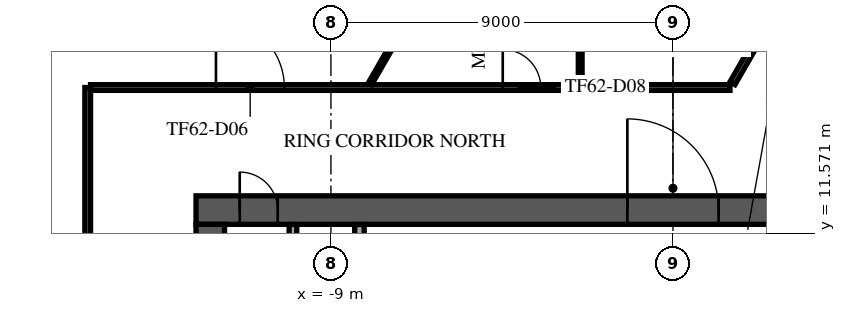
"""IFC4 building model, lengths in metres.
Left out: names, types, materials, properties, quantities, classifications, styles, units other than length and angle.
Written with IfcOpenShell. Run it as: python <this file> out.ifc"""

import sys

from ifc_helpers import new_model, si_unit, direction, frame, frame_2d, origin, place, context, subcontext, project, spatial, rectangle, extrude, element, fill, save


model = new_model("IFC4")
c1 = context("Model", 3, precision=1e-05, world=origin(), true_north=direction((0.0, 1.0)))
c2 = subcontext(c1, "Body", "Model", "MODEL_VIEW")
j1 = project(units=[si_unit("LENGTHUNIT", "METRE"), si_unit("PLANEANGLEUNIT", "RADIAN")], contexts=[c1])
p1 = place(None, origin())
s1 = spatial("IfcSite", under=j1, at=p1, CompositionType="ELEMENT")
p2 = place(p1, origin())
s2 = spatial("IfcBuilding", under=s1, at=p2, CompositionType="ELEMENT")
p3 = place(p2, frame((0.0, 0.0, 262.9)))
s3 = spatial("IfcBuildingStorey", under=s2, at=p3, CompositionType="ELEMENT", Elevation=262.9)
p4 = place(p3, frame((-12.55, 12.175, 0.0), z_axis=(0.0, 0.0, 1.0), x_axis=(1.0, 0.0, 0.0)))
e1 = element("IfcWall", 1, at=p4, inside=s3, PredefinedType="SHEAR", context=c2, shape_type="SweptSolid", body=[
    extrude(rectangle(XDim=25.1, YDim=0.75, at=frame_2d((12.55, 0.0))), origin(), (0.0, 0.0, 1.0), 3.64),
])
p5 = place(p4, frame((11.35, 0.0, 0.0)))
e2 = element("IfcOpeningElement", 2, at=p5, cuts=e1, PredefinedType="OPENING", context=c2, shape_type="SweptSolid", body=[
    extrude(rectangle(XDim=2.4, YDim=2.4, at=frame_2d((1.2, 1.2))), frame((0.0, 0.385, 0.0), z_axis=(0.0, -1.0, 0.0), x_axis=(1.0, 0.0, 0.0)), (0.0, 0.0, 1.0), 0.77),
])
p6 = place(p4, frame((22.175, 0.0, 0.0)))
e3 = element("IfcOpeningElement", 3, at=p6, cuts=e1, PredefinedType="OPENING", context=c2, shape_type="SweptSolid", body=[
    extrude(rectangle(XDim=1.2, YDim=2.1, at=frame_2d((0.6, 1.05))), frame((0.0, 0.385, 0.0), z_axis=(0.0, -1.0, 0.0), x_axis=(1.0, 0.0, 0.0)), (0.0, 0.0, 1.0), 0.77),
])
p7 = place(p4, frame((1.15, 0.0, 0.0)))
e4 = element("IfcOpeningElement", 4, at=p7, cuts=e1, PredefinedType="OPENING", context=c2, shape_type="SweptSolid", body=[
    extrude(rectangle(XDim=1.0, YDim=2.1, at=frame_2d((0.5, 1.05))), frame((0.0, 0.385, 0.0), z_axis=(0.0, -1.0, 0.0), x_axis=(1.0, 0.0, 0.0)), (0.0, 0.0, 1.0), 0.77),
])
p8 = place(p3, frame((-12.175, -11.8, 0.0), z_axis=(0.0, 0.0, 1.0), x_axis=(0.0, 1.0, 0.0)))
e5 = element("IfcWall", 5, at=p8, inside=s3, PredefinedType="SHEAR", context=c2, shape_type="SweptSolid", body=[
    extrude(rectangle(XDim=23.6, YDim=0.75, at=frame_2d((11.8, 0.0))), origin(), (0.0, 0.0, 1.0), 3.64),
])
p9 = place(p8, frame((10.6, 0.0, 0.0)))
e6 = element("IfcOpeningElement", 6, at=p9, cuts=e5, PredefinedType="OPENING", context=c2, shape_type="SweptSolid", body=[
    extrude(rectangle(XDim=2.4, YDim=2.4, at=frame_2d((1.2, 1.2))), frame((0.0, 0.385, 0.0), z_axis=(0.0, -1.0, 0.0), x_axis=(1.0, 0.0, 0.0)), (0.0, 0.0, 1.0), 0.77),
])
p10 = place(p3, frame((-10.0, 4.78, 0.0), z_axis=(0.0, 0.0, 1.0), x_axis=(0.0, 1.0, 0.0)))
e7 = element("IfcWall", 7, at=p10, inside=s3, PredefinedType="PARTITIONING", context=c2, shape_type="SweptSolid", body=[
    extrude(rectangle(XDim=7.015, YDim=0.2, at=frame_2d((3.507, 0.0))), origin(), (0.0, 0.0, 1.0), 3.64),
])
p11 = place(p10, frame((2.92, 0.0, 0.0)))
e8 = element("IfcOpeningElement", 8, at=p11, cuts=e7, PredefinedType="OPENING", context=c2, shape_type="SweptSolid", body=[
    extrude(rectangle(XDim=1.0, YDim=2.1, at=frame_2d((0.5, 1.05))), frame((0.0, 0.11, 0.0), z_axis=(0.0, -1.0, 0.0), x_axis=(1.0, 0.0, 0.0)), (0.0, 0.0, 1.0), 0.22),
])
p12 = place(p3, frame((-8.25, 8.805, 0.0), z_axis=(0.0, 0.0, 1.0), x_axis=(0.0, 1.0, 0.0)))
e9 = element("IfcWall", 9, at=p12, inside=s3, PredefinedType="PARTITIONING", context=c2, shape_type="SweptSolid", body=[
    extrude(rectangle(XDim=2.99, YDim=0.25, at=frame_2d((1.495, 0.0))), origin(), (0.0, 0.0, 1.0), 3.64),
])
p13 = place(p12, frame((0.895, 0.0, 0.0)))
e10 = element("IfcOpeningElement", 10, at=p13, cuts=e9, PredefinedType="OPENING", context=c2, shape_type="SweptSolid", body=[
    extrude(rectangle(XDim=1.0, YDim=2.1, at=frame_2d((0.5, 1.05))), frame((0.0, 0.135, 0.0), z_axis=(0.0, -1.0, 0.0), x_axis=(1.0, 0.0, 0.0)), (0.0, 0.0, 1.0), 0.27),
])
p14 = place(p3, frame((-8.015, 32.917, 0.0), z_axis=(0.0, 0.0, 1.0), x_axis=(-0.500001675963, -0.866024436165, 0.0)))
e11 = element("IfcWall", 11, at=p14, inside=s3, PredefinedType="STANDARD", context=c2, shape_type="SweptSolid", body=[
    extrude(rectangle(XDim=48.843, YDim=0.6, at=frame_2d((24.421, 0.0))), origin(), (0.0, 0.0, 1.0), 3.64),
])
p15 = place(p14, frame((1.22, 0.0, 0.9)))
e12 = element("IfcOpeningElement", 12, at=p15, cuts=e11, PredefinedType="OPENING", context=c2, shape_type="SweptSolid", body=[
    extrude(rectangle(XDim=2.0, YDim=2.1, at=frame_2d((1.0, 1.05))), frame((0.0, 0.31, 0.0), z_axis=(0.0, -1.0, 0.0), x_axis=(1.0, 0.0, 0.0)), (0.0, 0.0, 1.0), 0.62),
])
p16 = place(p14, frame((5.66, 0.0, 0.9)))
e13 = element("IfcOpeningElement", 13, at=p16, cuts=e11, PredefinedType="OPENING", context=c2, shape_type="SweptSolid", body=[
    extrude(rectangle(XDim=2.0, YDim=2.1, at=frame_2d((1.0, 1.05))), frame((0.0, 0.31, 0.0), z_axis=(0.0, -1.0, 0.0), x_axis=(1.0, 0.0, 0.0)), (0.0, 0.0, 1.0), 0.62),
])
p17 = place(p14, frame((10.101, 0.0, 0.9)))
e14 = element("IfcOpeningElement", 14, at=p17, cuts=e11, PredefinedType="OPENING", context=c2, shape_type="SweptSolid", body=[
    extrude(rectangle(XDim=2.0, YDim=2.1, at=frame_2d((1.0, 1.05))), frame((0.0, 0.31, 0.0), z_axis=(0.0, -1.0, 0.0), x_axis=(1.0, 0.0, 0.0)), (0.0, 0.0, 1.0), 0.62),
])
p18 = place(p14, frame((14.541, 0.0, 0.9)))
e15 = element("IfcOpeningElement", 15, at=p18, cuts=e11, PredefinedType="OPENING", context=c2, shape_type="SweptSolid", body=[
    extrude(rectangle(XDim=2.0, YDim=2.1, at=frame_2d((1.0, 1.05))), frame((0.0, 0.31, 0.0), z_axis=(0.0, -1.0, 0.0), x_axis=(1.0, 0.0, 0.0)), (0.0, 0.0, 1.0), 0.62),
])
p19 = place(p14, frame((18.981, 0.0, 0.9)))
e16 = element("IfcOpeningElement", 16, at=p19, cuts=e11, PredefinedType="OPENING", context=c2, shape_type="SweptSolid", body=[
    extrude(rectangle(XDim=2.0, YDim=2.1, at=frame_2d((1.0, 1.05))), frame((0.0, 0.31, 0.0), z_axis=(0.0, -1.0, 0.0), x_axis=(1.0, 0.0, 0.0)), (0.0, 0.0, 1.0), 0.62),
])
p20 = place(p14, frame((23.422, 0.0, 0.9)))
e17 = element("IfcOpeningElement", 17, at=p20, cuts=e11, PredefinedType="OPENING", context=c2, shape_type="SweptSolid", body=[
    extrude(rectangle(XDim=2.0, YDim=2.1, at=frame_2d((1.0, 1.05))), frame((0.0, 0.31, 0.0), z_axis=(0.0, -1.0, 0.0), x_axis=(1.0, 0.0, 0.0)), (0.0, 0.0, 1.0), 0.62),
])
p21 = place(p14, frame((27.862, 0.0, 0.9)))
e18 = element("IfcOpeningElement", 18, at=p21, cuts=e11, PredefinedType="OPENING", context=c2, shape_type="SweptSolid", body=[
    extrude(rectangle(XDim=2.0, YDim=2.1, at=frame_2d((1.0, 1.05))), frame((0.0, 0.31, 0.0), z_axis=(0.0, -1.0, 0.0), x_axis=(1.0, 0.0, 0.0)), (0.0, 0.0, 1.0), 0.62),
])
p22 = place(p14, frame((32.302, 0.0, 0.9)))
e19 = element("IfcOpeningElement", 19, at=p22, cuts=e11, PredefinedType="OPENING", context=c2, shape_type="SweptSolid", body=[
    extrude(rectangle(XDim=2.0, YDim=2.1, at=frame_2d((1.0, 1.05))), frame((0.0, 0.31, 0.0), z_axis=(0.0, -1.0, 0.0), x_axis=(1.0, 0.0, 0.0)), (0.0, 0.0, 1.0), 0.62),
])
p23 = place(p14, frame((36.742, 0.0, 0.9)))
e20 = element("IfcOpeningElement", 20, at=p23, cuts=e11, PredefinedType="OPENING", context=c2, shape_type="SweptSolid", body=[
    extrude(rectangle(XDim=2.0, YDim=2.1, at=frame_2d((1.0, 1.05))), frame((0.0, 0.31, 0.0), z_axis=(0.0, -1.0, 0.0), x_axis=(1.0, 0.0, 0.0)), (0.0, 0.0, 1.0), 0.62),
])
p24 = place(p14, frame((41.183, 0.0, 0.9)))
e21 = element("IfcOpeningElement", 21, at=p24, cuts=e11, PredefinedType="OPENING", context=c2, shape_type="SweptSolid", body=[
    extrude(rectangle(XDim=2.0, YDim=2.1, at=frame_2d((1.0, 1.05))), frame((0.0, 0.31, 0.0), z_axis=(0.0, -1.0, 0.0), x_axis=(1.0, 0.0, 0.0)), (0.0, 0.0, 1.0), 0.62),
])
p25 = place(p14, frame((45.623, 0.0, 0.9)))
e22 = element("IfcOpeningElement", 22, at=p25, cuts=e11, PredefinedType="OPENING", context=c2, shape_type="SweptSolid", body=[
    extrude(rectangle(XDim=2.0, YDim=2.1, at=frame_2d((1.0, 1.05))), frame((0.0, 0.31, 0.0), z_axis=(0.0, -1.0, 0.0), x_axis=(1.0, 0.0, 0.0)), (0.0, 0.0, 1.0), 0.62),
])
p26 = place(p3, frame((-15.4, -10.72, 0.0), z_axis=(0.0, 0.0, 1.0), x_axis=(0.0, 1.0, 0.0)))
e23 = element("IfcWall", 23, at=p26, inside=s3, PredefinedType="PARTITIONING", context=c2, shape_type="SweptSolid", body=[
    extrude(rectangle(XDim=26.12, YDim=0.15, at=frame_2d((13.06, 0.0))), origin(), (0.0, 0.0, 1.0), 3.24),
])
p27 = place(p26, frame((1.05, 0.0, 0.0)))
e24 = element("IfcOpeningElement", 24, at=p27, cuts=e23, PredefinedType="OPENING", context=c2, shape_type="SweptSolid", body=[
    extrude(rectangle(XDim=1.0, YDim=2.1, at=frame_2d((0.5, 1.05))), frame((0.0, 0.085, 0.0), z_axis=(0.0, -1.0, 0.0), x_axis=(1.0, 0.0, 0.0)), (0.0, 0.0, 1.0), 0.17),
])
p28 = place(p26, frame((15.124, 0.0, 0.0)))
e25 = element("IfcOpeningElement", 25, at=p28, cuts=e23, PredefinedType="OPENING", context=c2, shape_type="SweptSolid", body=[
    extrude(rectangle(XDim=1.0, YDim=2.1, at=frame_2d((0.5, 1.05))), frame((0.0, 0.085, 0.0), z_axis=(0.0, -1.0, 0.0), x_axis=(1.0, 0.0, 0.0)), (0.0, 0.0, 1.0), 0.17),
])
p29 = place(p3, frame((-15.325, 15.4, 0.0), z_axis=(0.0, 0.0, 1.0), x_axis=(1.0, 0.0, 0.0)))
e26 = element("IfcWall", 26, at=p29, inside=s3, PredefinedType="PARTITIONING", context=c2, shape_type="SweptSolid", body=[
    extrude(rectangle(XDim=16.826, YDim=0.15, at=frame_2d((8.413, 0.0))), origin(), (0.0, 0.0, 1.0), 3.24),
])
p30 = place(p29, frame((3.3, 0.0, 0.0)))
e27 = element("IfcOpeningElement", 27, at=p30, cuts=e26, PredefinedType="OPENING", context=c2, shape_type="SweptSolid", body=[
    extrude(rectangle(XDim=1.8, YDim=2.1, at=frame_2d((0.9, 1.05))), frame((0.0, 0.085, 0.0), z_axis=(0.0, -1.0, 0.0), x_axis=(1.0, 0.0, 0.0)), (0.0, 0.0, 1.0), 0.17),
])
p31 = place(p29, frame((10.846, 0.0, 0.0)))
e28 = element("IfcOpeningElement", 28, at=p31, cuts=e26, PredefinedType="OPENING", context=c2, shape_type="SweptSolid", body=[
    extrude(rectangle(XDim=1.0, YDim=2.1, at=frame_2d((0.5, 1.05))), frame((0.0, 0.085, 0.0), z_axis=(0.0, -1.0, 0.0), x_axis=(1.0, 0.0, 0.0)), (0.0, 0.0, 1.0), 0.17),
])
p32 = place(p3, frame((-7.247, 26.698, 0.0), z_axis=(0.0, 0.0, 1.0), x_axis=(0.866022442497, -0.500005129065, 0.0)))
e29 = element("IfcWall", 29, at=p32, inside=s3, PredefinedType="PARTITIONING", context=c2, shape_type="SweptSolid", body=[
    extrude(rectangle(XDim=39.325, YDim=0.15, at=frame_2d((19.662, 0.0))), origin(), (0.0, 0.0, 1.0), 3.04),
])
p33 = place(p32, frame((15.654, 0.0, 0.0)))
e30 = element("IfcOpeningElement", 30, at=p33, cuts=e29, PredefinedType="OPENING", context=c2, shape_type="SweptSolid", body=[
    extrude(rectangle(XDim=1.0, YDim=2.1, at=frame_2d((0.5, 1.05))), frame((0.0, 0.085, 0.0), z_axis=(0.0, -1.0, 0.0), x_axis=(1.0, 0.0, 0.0)), (0.0, 0.0, 1.0), 0.17),
])
p34 = place(p32, frame((23.442, 0.0, 0.0)))
e31 = element("IfcOpeningElement", 31, at=p34, cuts=e29, PredefinedType="OPENING", context=c2, shape_type="SweptSolid", body=[
    extrude(rectangle(XDim=1.0, YDim=2.1, at=frame_2d((0.5, 1.05))), frame((0.0, 0.085, 0.0), z_axis=(0.0, -1.0, 0.0), x_axis=(1.0, 0.0, 0.0)), (0.0, 0.0, 1.0), 0.17),
])
p35 = place(p32, frame((31.841, 0.0, 0.0)))
e32 = element("IfcOpeningElement", 32, at=p35, cuts=e29, PredefinedType="OPENING", context=c2, shape_type="SweptSolid", body=[
    extrude(rectangle(XDim=1.0, YDim=2.1, at=frame_2d((0.5, 1.05))), frame((0.0, 0.085, 0.0), z_axis=(0.0, -1.0, 0.0), x_axis=(1.0, 0.0, 0.0)), (0.0, 0.0, 1.0), 0.17),
])
p36 = place(p32, frame((36.955, 0.0, 0.0)))
e33 = element("IfcOpeningElement", 33, at=p36, cuts=e29, PredefinedType="OPENING", context=c2, shape_type="SweptSolid", body=[
    extrude(rectangle(XDim=1.0, YDim=2.1, at=frame_2d((0.5, 1.05))), frame((0.0, 0.085, 0.0), z_axis=(0.0, -1.0, 0.0), x_axis=(1.0, 0.0, 0.0)), (0.0, 0.0, 1.0), 0.17),
])
p37 = place(p3, frame((1.566, 15.512, 0.0), z_axis=(0.0, 0.0, 1.0), x_axis=(0.500136902793, 0.865946348491, 0.0)))
e34 = element("IfcWall", 34, at=p37, inside=s3, PredefinedType="PARTITIONING", context=c2, shape_type="SweptSolid", body=[
    extrude(rectangle(XDim=2.804, YDim=0.15, at=frame_2d((1.402, 0.0))), origin(), (0.0, 0.0, 1.0), 3.64),
])
p38 = place(p3, frame((-7.971, 15.5, 0.0), z_axis=(0.0, 0.0, 1.0), x_axis=(0.499964887799, 0.866045674874, 0.0)))
e35 = element("IfcWall", 35, at=p38, inside=s3, PredefinedType="PARTITIONING", context=c2, shape_type="SweptSolid", body=[
    extrude(rectangle(XDim=7.584, YDim=0.1, at=frame_2d((3.792, 0.0))), origin(), (0.0, 0.0, 1.0), 3.24),
])
p39 = place(p3, frame((-2.441, 15.475, 0.0), z_axis=(0.0, 0.0, 1.0), x_axis=(0.0, 1.0, 0.0)))
e36 = element("IfcWall", 36, at=p39, inside=s3, PredefinedType="PARTITIONING", context=c2, shape_type="SweptSolid", body=[
    extrude(rectangle(XDim=5.56, YDim=0.1, at=frame_2d((2.78, 0.0))), origin(), (0.0, 0.0, 1.0), 3.64),
])
p40 = place(p5, origin())
e37 = element("IfcDoor", 37, at=p40, inside=s3, OperationType="SINGLE_SWING_LEFT", PredefinedType="DOOR", context=c2, shape_type="SweptSolid", body=[
    extrude(rectangle(XDim=2.4, YDim=2.4, at=frame_2d((1.2, 1.2))), frame((0.0, 0.025, 0.0), z_axis=(0.0, -1.0, 0.0), x_axis=(1.0, 0.0, 0.0)), (0.0, 0.0, 1.0), 0.05),
])
fill(e2, e37)
p41 = place(p7, origin())
e38 = element("IfcDoor", 38, at=p41, inside=s3, OperationType="SINGLE_SWING_LEFT", PredefinedType="DOOR", context=c2, shape_type="SweptSolid", body=[
    extrude(rectangle(XDim=1.0, YDim=2.1, at=frame_2d((0.5, 1.05))), frame((0.0, 0.025, 0.0), z_axis=(0.0, -1.0, 0.0), x_axis=(1.0, 0.0, 0.0)), (0.0, 0.0, 1.0), 0.05),
])
fill(e4, e38)
p42 = place(p30, origin())
e39 = element("IfcDoor", 39, at=p42, inside=s3, OperationType="DOUBLE_DOOR_SINGLE_SWING", PredefinedType="DOOR", context=c2, shape_type="SweptSolid", body=[
    extrude(rectangle(XDim=1.8, YDim=2.1, at=frame_2d((0.9, 1.05))), frame((0.0, 0.025, 0.0), z_axis=(0.0, -1.0, 0.0), x_axis=(1.0, 0.0, 0.0)), (0.0, 0.0, 1.0), 0.05),
])
fill(e27, e39)
p43 = place(p31, origin())
e40 = element("IfcDoor", 40, at=p43, inside=s3, OperationType="SINGLE_SWING_RIGHT", PredefinedType="DOOR", context=c2, shape_type="SweptSolid", body=[
    extrude(rectangle(XDim=1.0, YDim=2.1, at=frame_2d((0.5, 1.05))), frame((0.0, 0.025, 0.0), z_axis=(0.0, -1.0, 0.0), x_axis=(1.0, 0.0, 0.0)), (0.0, 0.0, 1.0), 0.05),
])
fill(e28, e40)
save(model, sys.argv[1])
